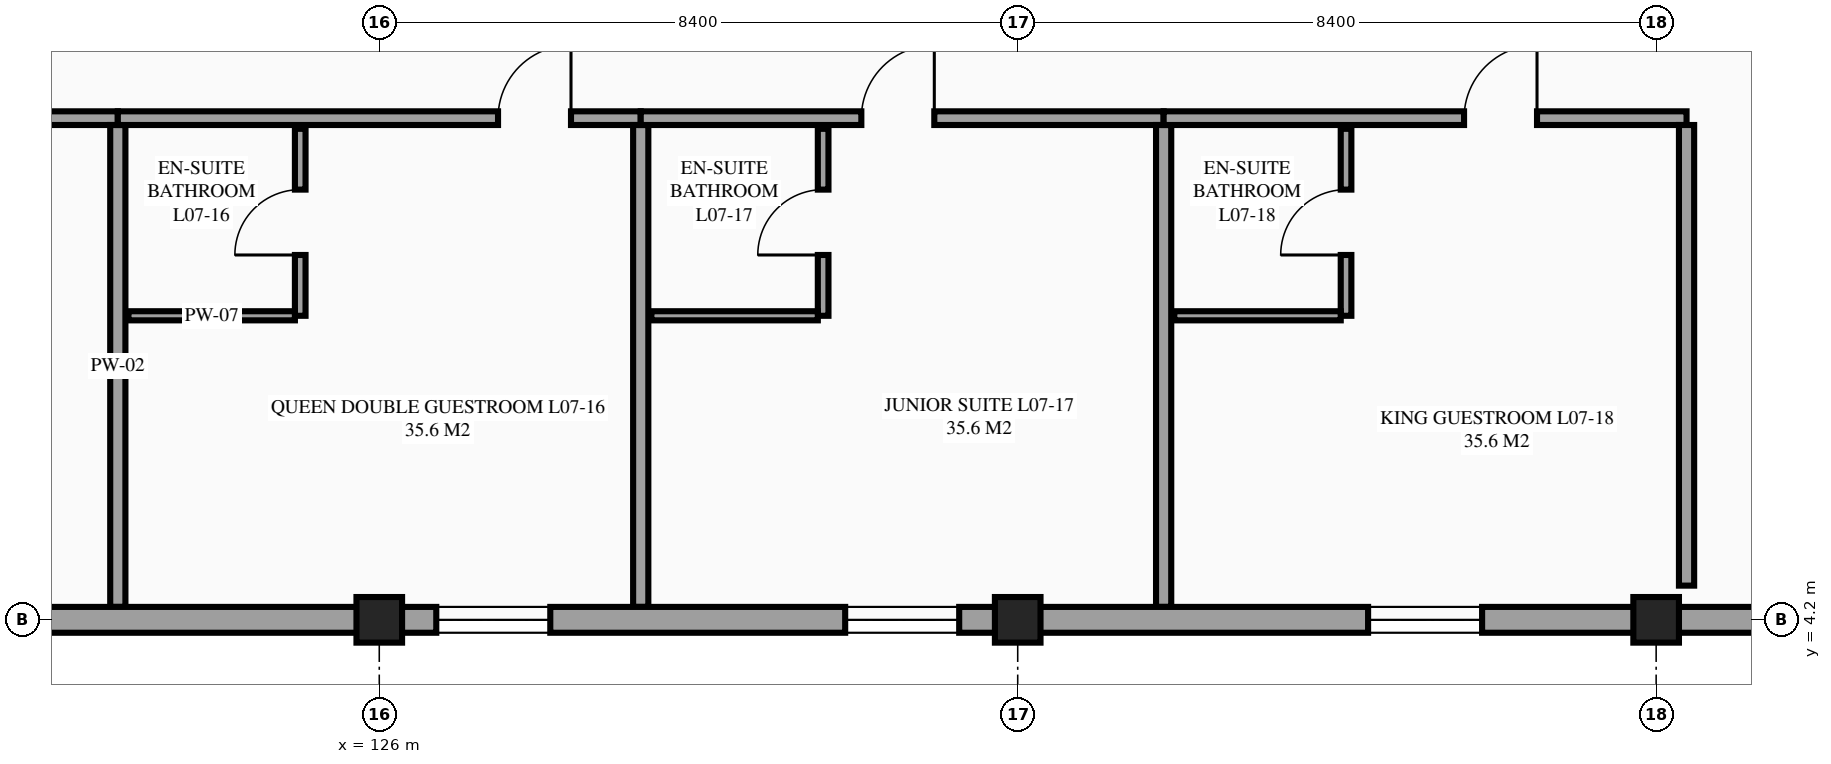
"""IFC4 building model, lengths in metres.
Left out: names, types, materials, properties, quantities, classifications, styles, units other than length and angle.
Written with IfcOpenShell. Run it as: python <this file> out.ifc"""

import sys

from ifc_helpers import new_model, si_unit, direction, frame, frame_2d, origin, origin_2d, place, context, subcontext, project, spatial, rectangle, extrude, element, fill, save


model = new_model("IFC4")
c1 = context("Model", 3, precision=1e-05, world=origin(), true_north=direction((0.0, 1.0)))
c2 = subcontext(c1, "Body", "Model", "MODEL_VIEW")
j1 = project(units=[si_unit("LENGTHUNIT", "METRE"), si_unit("PLANEANGLEUNIT", "RADIAN")], contexts=[c1])
p1 = place(None, origin())
s1 = spatial("IfcSite", under=j1, at=p1, CompositionType="ELEMENT")
p2 = place(p1, origin())
s2 = spatial("IfcBuilding", under=s1, at=p2, CompositionType="ELEMENT")
p3 = place(p2, frame((0.0, 0.0, 29.1)))
s3 = spatial("IfcBuildingStorey", under=s2, at=p3, CompositionType="ELEMENT", Elevation=29.1)
for number, where, z_axis, x_axis in (
    (1, (126.0, 4.2, 0.0), (0.0, 0.0, 1.0), (1.0, 0.0, 0.0)),
    (2, (134.4, 4.2, 0.0), (0.0, 0.0, 1.0), (1.0, 0.0, 0.0)),
    (3, (142.8, 4.2, 0.0), (0.0, 0.0, 1.0), (1.0, 0.0, 0.0)),
):
    element("IfcColumn", number, at=place(p3, frame(where, z_axis=z_axis, x_axis=x_axis)), inside=s3, PredefinedType="COLUMN", context=c2, shape_type="SweptSolid", body=[
        extrude(rectangle(XDim=0.6, YDim=0.6, at=origin_2d()), origin(), (0.0, 0.0, 1.0), 3.6),
    ])
p4 = place(p3, frame((115.68, 10.8, 0.0), z_axis=(0.0, 0.0, 1.0), x_axis=(1.0, 0.0, 0.0)))
e4 = element("IfcWall", 4, at=p4, inside=s3, PredefinedType="PARTITIONING", context=c2, shape_type="SweptSolid", body=[
    extrude(rectangle(XDim=6.88, YDim=0.18, at=frame_2d((3.44, 0.0))), origin(), (0.0, 0.0, 1.0), 3.375),
])
p5 = place(p4, frame((4.653, 0.0, 0.0)))
e5 = element("IfcOpeningElement", 5, at=p5, cuts=e4, PredefinedType="OPENING", context=c2, shape_type="SweptSolid", body=[
    extrude(rectangle(XDim=0.96, YDim=2.15, at=frame_2d((0.48, 1.075))), frame((0.0, 0.1, 0.0), z_axis=(0.0, -1.0, 0.0), x_axis=(1.0, 0.0, 0.0)), (0.0, 0.0, 1.0), 0.2),
])
p6 = place(p3, frame((122.56, 4.37, 0.0), z_axis=(0.0, 0.0, 1.0), x_axis=(0.0, 1.0, 0.0)))
e6 = element("IfcWall", 6, at=p6, inside=s3, PredefinedType="PARTITIONING", context=c2, shape_type="SweptSolid", body=[
    extrude(rectangle(XDim=6.34, YDim=0.2, at=frame_2d((3.17, 0.0))), origin(), (0.0, 0.0, 1.0), 3.375),
])
p7 = place(p3, frame((122.56, 10.8, 0.0), z_axis=(0.0, 0.0, 1.0), x_axis=(1.0, 0.0, 0.0)))
e7 = element("IfcWall", 7, at=p7, inside=s3, PredefinedType="PARTITIONING", context=c2, shape_type="SweptSolid", body=[
    extrude(rectangle(XDim=6.88, YDim=0.18, at=frame_2d((3.44, 0.0))), origin(), (0.0, 0.0, 1.0), 3.375),
])
p8 = place(p7, frame((5.003, 0.0, 0.0)))
e8 = element("IfcOpeningElement", 8, at=p8, cuts=e7, PredefinedType="OPENING", context=c2, shape_type="SweptSolid", body=[
    extrude(rectangle(XDim=0.96, YDim=2.15, at=frame_2d((0.48, 1.075))), frame((0.0, 0.1, 0.0), z_axis=(0.0, -1.0, 0.0), x_axis=(1.0, 0.0, 0.0)), (0.0, 0.0, 1.0), 0.2),
])
p9 = place(p3, frame((129.44, 4.37, 0.0), z_axis=(0.0, 0.0, 1.0), x_axis=(0.0, 1.0, 0.0)))
e9 = element("IfcWall", 9, at=p9, inside=s3, PredefinedType="PARTITIONING", context=c2, shape_type="SweptSolid", body=[
    extrude(rectangle(XDim=6.34, YDim=0.2, at=frame_2d((3.17, 0.0))), origin(), (0.0, 0.0, 1.0), 3.375),
])
p10 = place(p3, frame((124.96, 8.2, 0.0), z_axis=(0.0, 0.0, 1.0), x_axis=(0.0, 1.0, 0.0)))
e10 = element("IfcWall", 10, at=p10, inside=s3, PredefinedType="PARTITIONING", context=c2, shape_type="SweptSolid", body=[
    extrude(rectangle(XDim=2.46, YDim=0.14, at=frame_2d((1.23, 0.0))), origin(), (0.0, 0.0, 1.0), 3.375),
])
p11 = place(p10, frame((0.8, 0.0, 0.0)))
e11 = element("IfcOpeningElement", 11, at=p11, cuts=e10, PredefinedType="OPENING", context=c2, shape_type="SweptSolid", body=[
    extrude(rectangle(XDim=0.86, YDim=2.1, at=frame_2d((0.43, 1.05))), frame((0.0, 0.08, 0.0), z_axis=(0.0, -1.0, 0.0), x_axis=(1.0, 0.0, 0.0)), (0.0, 0.0, 1.0), 0.16),
])
p12 = place(p3, frame((122.7, 8.2, 0.0), z_axis=(0.0, 0.0, 1.0), x_axis=(1.0, 0.0, 0.0)))
e12 = element("IfcWall", 12, at=p12, inside=s3, PredefinedType="PARTITIONING", context=c2, shape_type="SweptSolid", body=[
    extrude(rectangle(XDim=2.19, YDim=0.12, at=frame_2d((1.095, 0.0))), origin(), (0.0, 0.0, 1.0), 3.375),
])
p13 = place(p3, frame((129.44, 10.8, 0.0), z_axis=(0.0, 0.0, 1.0), x_axis=(1.0, 0.0, 0.0)))
e13 = element("IfcWall", 13, at=p13, inside=s3, PredefinedType="PARTITIONING", context=c2, shape_type="SweptSolid", body=[
    extrude(rectangle(XDim=6.88, YDim=0.18, at=frame_2d((3.44, 0.0))), origin(), (0.0, 0.0, 1.0), 3.375),
])
p14 = place(p13, frame((2.903, 0.0, 0.0)))
e14 = element("IfcOpeningElement", 14, at=p14, cuts=e13, PredefinedType="OPENING", context=c2, shape_type="SweptSolid", body=[
    extrude(rectangle(XDim=0.96, YDim=2.15, at=frame_2d((0.48, 1.075))), frame((0.0, 0.1, 0.0), z_axis=(0.0, -1.0, 0.0), x_axis=(1.0, 0.0, 0.0)), (0.0, 0.0, 1.0), 0.2),
])
p15 = place(p3, frame((136.32, 4.37, 0.0), z_axis=(0.0, 0.0, 1.0), x_axis=(0.0, 1.0, 0.0)))
e15 = element("IfcWall", 15, at=p15, inside=s3, PredefinedType="PARTITIONING", context=c2, shape_type="SweptSolid", body=[
    extrude(rectangle(XDim=6.34, YDim=0.2, at=frame_2d((3.17, 0.0))), origin(), (0.0, 0.0, 1.0), 3.375),
])
p16 = place(p3, frame((131.84, 8.2, 0.0), z_axis=(0.0, 0.0, 1.0), x_axis=(0.0, 1.0, 0.0)))
e16 = element("IfcWall", 16, at=p16, inside=s3, PredefinedType="PARTITIONING", context=c2, shape_type="SweptSolid", body=[
    extrude(rectangle(XDim=2.46, YDim=0.14, at=frame_2d((1.23, 0.0))), origin(), (0.0, 0.0, 1.0), 3.375),
])
p17 = place(p16, frame((0.8, 0.0, 0.0)))
e17 = element("IfcOpeningElement", 17, at=p17, cuts=e16, PredefinedType="OPENING", context=c2, shape_type="SweptSolid", body=[
    extrude(rectangle(XDim=0.86, YDim=2.1, at=frame_2d((0.43, 1.05))), frame((0.0, 0.08, 0.0), z_axis=(0.0, -1.0, 0.0), x_axis=(1.0, 0.0, 0.0)), (0.0, 0.0, 1.0), 0.16),
])
p18 = place(p3, frame((129.58, 8.2, 0.0), z_axis=(0.0, 0.0, 1.0), x_axis=(1.0, 0.0, 0.0)))
e18 = element("IfcWall", 18, at=p18, inside=s3, PredefinedType="PARTITIONING", context=c2, shape_type="SweptSolid", body=[
    extrude(rectangle(XDim=2.19, YDim=0.12, at=frame_2d((1.095, 0.0))), origin(), (0.0, 0.0, 1.0), 3.375),
])
p19 = place(p3, frame((136.32, 10.8, 0.0), z_axis=(0.0, 0.0, 1.0), x_axis=(1.0, 0.0, 0.0)))
e19 = element("IfcWall", 19, at=p19, inside=s3, PredefinedType="PARTITIONING", context=c2, shape_type="SweptSolid", body=[
    extrude(rectangle(XDim=6.88, YDim=0.18, at=frame_2d((3.44, 0.0))), origin(), (0.0, 0.0, 1.0), 3.375),
])
p20 = place(p19, frame((3.953, 0.0, 0.0)))
e20 = element("IfcOpeningElement", 20, at=p20, cuts=e19, PredefinedType="OPENING", context=c2, shape_type="SweptSolid", body=[
    extrude(rectangle(XDim=0.96, YDim=2.15, at=frame_2d((0.48, 1.075))), frame((0.0, 0.1, 0.0), z_axis=(0.0, -1.0, 0.0), x_axis=(1.0, 0.0, 0.0)), (0.0, 0.0, 1.0), 0.2),
])
p21 = place(p3, frame((143.2, 4.65, 0.0), z_axis=(0.0, 0.0, 1.0), x_axis=(0.0, 1.0, 0.0)))
e21 = element("IfcWall", 21, at=p21, inside=s3, PredefinedType="PARTITIONING", context=c2, shape_type="SweptSolid", body=[
    extrude(rectangle(XDim=6.06, YDim=0.2, at=frame_2d((3.03, 0.0))), origin(), (0.0, 0.0, 1.0), 3.375),
])
p22 = place(p3, frame((138.72, 8.2, 0.0), z_axis=(0.0, 0.0, 1.0), x_axis=(0.0, 1.0, 0.0)))
e22 = element("IfcWall", 22, at=p22, inside=s3, PredefinedType="PARTITIONING", context=c2, shape_type="SweptSolid", body=[
    extrude(rectangle(XDim=2.46, YDim=0.14, at=frame_2d((1.23, 0.0))), origin(), (0.0, 0.0, 1.0), 3.375),
])
p23 = place(p22, frame((0.8, 0.0, 0.0)))
e23 = element("IfcOpeningElement", 23, at=p23, cuts=e22, PredefinedType="OPENING", context=c2, shape_type="SweptSolid", body=[
    extrude(rectangle(XDim=0.86, YDim=2.1, at=frame_2d((0.43, 1.05))), frame((0.0, 0.08, 0.0), z_axis=(0.0, -1.0, 0.0), x_axis=(1.0, 0.0, 0.0)), (0.0, 0.0, 1.0), 0.16),
])
p24 = place(p3, frame((136.46, 8.2, 0.0), z_axis=(0.0, 0.0, 1.0), x_axis=(1.0, 0.0, 0.0)))
e24 = element("IfcWall", 24, at=p24, inside=s3, PredefinedType="PARTITIONING", context=c2, shape_type="SweptSolid", body=[
    extrude(rectangle(XDim=2.19, YDim=0.12, at=frame_2d((1.095, 0.0))), origin(), (0.0, 0.0, 1.0), 3.375),
])
p25 = place(p3, frame((117.6, 4.2, 0.0), z_axis=(0.0, 0.0, 1.0), x_axis=(1.0, 0.0, 0.0)))
e25 = element("IfcWall", 25, at=p25, inside=s3, PredefinedType="STANDARD", context=c2, shape_type="SweptSolid", body=[
    extrude(rectangle(XDim=8.4, YDim=0.34, at=frame_2d((4.2, 0.0))), origin(), (0.0, 0.0, 1.0), 3.126),
])
p26 = place(p25, frame((0.77, 0.0, 0.85)))
e26 = element("IfcOpeningElement", 26, at=p26, cuts=e25, PredefinedType="OPENING", context=c2, shape_type="SweptSolid", body=[
    extrude(rectangle(XDim=1.5, YDim=1.5, at=frame_2d((0.75, 0.75))), frame((0.0, 0.18, 0.0), z_axis=(0.0, -1.0, 0.0), x_axis=(1.0, 0.0, 0.0)), (0.0, 0.0, 1.0), 0.36),
])
p27 = place(p3, frame((126.0, 4.2, 0.0), z_axis=(0.0, 0.0, 1.0), x_axis=(1.0, 0.0, 0.0)))
e27 = element("IfcWall", 27, at=p27, inside=s3, PredefinedType="STANDARD", context=c2, shape_type="SweptSolid", body=[
    extrude(rectangle(XDim=16.8, YDim=0.34, at=frame_2d((8.4, 0.0))), origin(), (0.0, 0.0, 1.0), 2.63),
])
p28 = place(p27, frame((0.75, 0.0, 0.85)))
e28 = element("IfcOpeningElement", 28, at=p28, cuts=e27, PredefinedType="OPENING", context=c2, shape_type="SweptSolid", body=[
    extrude(rectangle(XDim=1.5, YDim=1.5, at=frame_2d((0.75, 0.75))), frame((0.0, 0.18, 0.0), z_axis=(0.0, -1.0, 0.0), x_axis=(1.0, 0.0, 0.0)), (0.0, 0.0, 1.0), 0.36),
])
p29 = place(p27, frame((6.13, 0.0, 0.85)))
e29 = element("IfcOpeningElement", 29, at=p29, cuts=e27, PredefinedType="OPENING", context=c2, shape_type="SweptSolid", body=[
    extrude(rectangle(XDim=1.5, YDim=1.5, at=frame_2d((0.75, 0.75))), frame((0.0, 0.18, 0.0), z_axis=(0.0, -1.0, 0.0), x_axis=(1.0, 0.0, 0.0)), (0.0, 0.0, 1.0), 0.36),
])
p30 = place(p27, frame((13.01, 0.0, 0.85)))
e30 = element("IfcOpeningElement", 30, at=p30, cuts=e27, PredefinedType="OPENING", context=c2, shape_type="SweptSolid", body=[
    extrude(rectangle(XDim=1.5, YDim=1.5, at=frame_2d((0.75, 0.75))), frame((0.0, 0.18, 0.0), z_axis=(0.0, -1.0, 0.0), x_axis=(1.0, 0.0, 0.0)), (0.0, 0.0, 1.0), 0.36),
])
p31 = place(p3, frame((142.8, 4.2, 0.0), z_axis=(0.0, 0.0, 1.0), x_axis=(1.0, 0.0, 0.0)))
e31 = element("IfcWall", 31, at=p31, inside=s3, PredefinedType="STANDARD", context=c2, shape_type="SweptSolid", body=[
    extrude(rectangle(XDim=8.4, YDim=0.34, at=frame_2d((4.2, 0.0))), origin(), (0.0, 0.0, 1.0), 3.133),
])
p32 = place(p28, origin())
e32 = element("IfcWindow", 32, at=p32, inside=s3, PartitioningType="SINGLE_PANEL", PredefinedType="WINDOW", context=c2, shape_type="SweptSolid", body=[
    extrude(rectangle(XDim=1.5, YDim=1.5, at=frame_2d((0.75, 0.75))), frame((0.0, 0.03, 0.0), z_axis=(0.0, -1.0, 0.0), x_axis=(1.0, 0.0, 0.0)), (0.0, 0.0, 1.0), 0.06),
])
fill(e28, e32)
p33 = place(p29, origin())
e33 = element("IfcWindow", 33, at=p33, inside=s3, PartitioningType="SINGLE_PANEL", PredefinedType="WINDOW", context=c2, shape_type="SweptSolid", body=[
    extrude(rectangle(XDim=1.5, YDim=1.5, at=frame_2d((0.75, 0.75))), frame((0.0, 0.03, 0.0), z_axis=(0.0, -1.0, 0.0), x_axis=(1.0, 0.0, 0.0)), (0.0, 0.0, 1.0), 0.06),
])
fill(e29, e33)
p34 = place(p30, origin())
e34 = element("IfcWindow", 34, at=p34, inside=s3, PartitioningType="SINGLE_PANEL", PredefinedType="WINDOW", context=c2, shape_type="SweptSolid", body=[
    extrude(rectangle(XDim=1.5, YDim=1.5, at=frame_2d((0.75, 0.75))), frame((0.0, 0.03, 0.0), z_axis=(0.0, -1.0, 0.0), x_axis=(1.0, 0.0, 0.0)), (0.0, 0.0, 1.0), 0.06),
])
fill(e30, e34)
p35 = place(p8, origin())
e35 = element("IfcDoor", 35, at=p35, inside=s3, OperationType="SINGLE_SWING_RIGHT", PredefinedType="DOOR", context=c2, shape_type="SweptSolid", body=[
    extrude(rectangle(XDim=0.96, YDim=2.15, at=frame_2d((0.48, 1.075))), frame((0.0, 0.025, 0.0), z_axis=(0.0, -1.0, 0.0), x_axis=(1.0, 0.0, 0.0)), (0.0, 0.0, 1.0), 0.05),
])
fill(e8, e35)
p36 = place(p11, origin())
e36 = element("IfcDoor", 36, at=p36, inside=s3, OperationType="SINGLE_SWING_LEFT", PredefinedType="DOOR", context=c2, shape_type="SweptSolid", body=[
    extrude(rectangle(XDim=0.86, YDim=2.1, at=frame_2d((0.43, 1.05))), frame((0.0, 0.025, 0.0), z_axis=(0.0, -1.0, 0.0), x_axis=(1.0, 0.0, 0.0)), (0.0, 0.0, 1.0), 0.05),
])
fill(e11, e36)
p37 = place(p14, origin())
e37 = element("IfcDoor", 37, at=p37, inside=s3, OperationType="SINGLE_SWING_RIGHT", PredefinedType="DOOR", context=c2, shape_type="SweptSolid", body=[
    extrude(rectangle(XDim=0.96, YDim=2.15, at=frame_2d((0.48, 1.075))), frame((0.0, 0.025, 0.0), z_axis=(0.0, -1.0, 0.0), x_axis=(1.0, 0.0, 0.0)), (0.0, 0.0, 1.0), 0.05),
])
fill(e14, e37)
p38 = place(p17, origin())
e38 = element("IfcDoor", 38, at=p38, inside=s3, OperationType="SINGLE_SWING_LEFT", PredefinedType="DOOR", context=c2, shape_type="SweptSolid", body=[
    extrude(rectangle(XDim=0.86, YDim=2.1, at=frame_2d((0.43, 1.05))), frame((0.0, 0.025, 0.0), z_axis=(0.0, -1.0, 0.0), x_axis=(1.0, 0.0, 0.0)), (0.0, 0.0, 1.0), 0.05),
])
fill(e17, e38)
p39 = place(p20, origin())
e39 = element("IfcDoor", 39, at=p39, inside=s3, OperationType="SINGLE_SWING_RIGHT", PredefinedType="DOOR", context=c2, shape_type="SweptSolid", body=[
    extrude(rectangle(XDim=0.96, YDim=2.15, at=frame_2d((0.48, 1.075))), frame((0.0, 0.025, 0.0), z_axis=(0.0, -1.0, 0.0), x_axis=(1.0, 0.0, 0.0)), (0.0, 0.0, 1.0), 0.05),
])
fill(e20, e39)
p40 = place(p23, origin())
e40 = element("IfcDoor", 40, at=p40, inside=s3, OperationType="SINGLE_SWING_LEFT", PredefinedType="DOOR", context=c2, shape_type="SweptSolid", body=[
    extrude(rectangle(XDim=0.86, YDim=2.1, at=frame_2d((0.43, 1.05))), frame((0.0, 0.025, 0.0), z_axis=(0.0, -1.0, 0.0), x_axis=(1.0, 0.0, 0.0)), (0.0, 0.0, 1.0), 0.05),
])
fill(e23, e40)
save(model, sys.argv[1])
